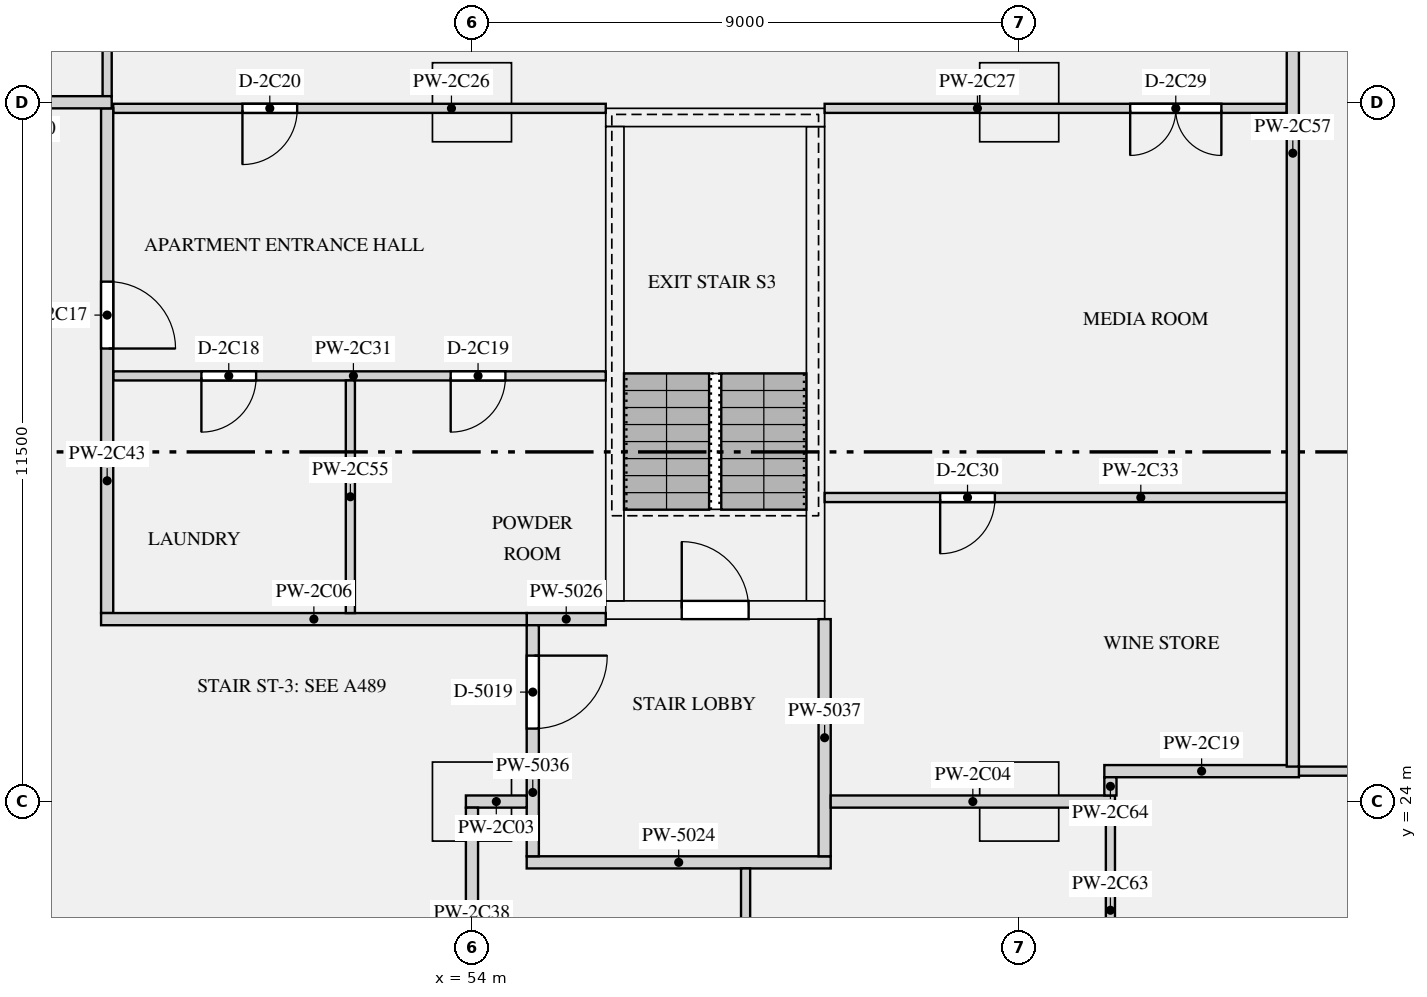
"""IFC4 building model, lengths in metres.
Left out: names, types, materials, properties, quantities, classifications, styles, units other than length and angle.
Written with IfcOpenShell. Run it as: python <this file> out.ifc"""

import sys

from ifc_helpers import new_model, si_unit, direction, frame, frame_2d, origin, origin_2d, place, context, subcontext, project, spatial, rectangle, extrude, element, fill, save


model = new_model("IFC4")
c1 = context("Model", 3, precision=1e-05, world=origin(), true_north=direction((0.0, 1.0)))
c2 = subcontext(c1, "Body", "Model", "MODEL_VIEW")
j1 = project(units=[si_unit("LENGTHUNIT", "METRE"), si_unit("PLANEANGLEUNIT", "RADIAN")], contexts=[c1])
p1 = place(None, origin())
s1 = spatial("IfcSite", under=j1, at=p1, CompositionType="ELEMENT")
p2 = place(p1, origin())
s2 = spatial("IfcBuilding", under=s1, at=p2, CompositionType="ELEMENT")
p3 = place(p2, frame((0.0, 0.0, 102.45)))
s3 = spatial("IfcBuildingStorey", under=s2, at=p3, CompositionType="ELEMENT", Elevation=102.45)
for number, where, z_axis, x_axis in (
    (1, (54.0, 24.0, 0.0), (0.0, 0.0, 1.0), (1.0, 0.0, 0.0)),
    (2, (63.0, 24.0, 0.0), (0.0, 0.0, 1.0), (1.0, 0.0, 0.0)),
    (3, (54.0, 35.5, 0.0), (0.0, 0.0, 1.0), (1.0, 0.0, 0.0)),
    (4, (63.0, 35.5, 0.0), (0.0, 0.0, 1.0), (1.0, 0.0, 0.0)),
):
    element("IfcColumn", number, at=place(p3, frame(where, z_axis=z_axis, x_axis=x_axis)), inside=s3, PredefinedType="COLUMN", context=c2, shape_type="SweptSolid", body=[
        extrude(rectangle(XDim=1.3, YDim=1.3, at=origin_2d()), origin(), (0.0, 0.0, 1.0), 3.15),
    ])
p4 = place(p3, frame((56.2, 27.15, 0.0), z_axis=(0.0, 0.0, 1.0), x_axis=(1.0, 0.0, 0.0)))
e5 = element("IfcWall", 5, at=p4, inside=s3, PredefinedType="SHEAR", context=c2, shape_type="SweptSolid", body=[
    extrude(rectangle(XDim=3.6, YDim=0.3, at=frame_2d((1.8, 0.0))), origin(), (0.0, 0.0, 1.0), 3.15),
])
p5 = place(p4, frame((1.25, 0.0, 0.0)))
e6 = element("IfcOpeningElement", 6, at=p5, cuts=e5, PredefinedType="OPENING", context=c2, shape_type="SweptSolid", body=[
    extrude(rectangle(XDim=1.1, YDim=2.1, at=frame_2d((0.55, 1.05))), frame((0.0, 0.16, 0.0), z_axis=(0.0, -1.0, 0.0), x_axis=(1.0, 0.0, 0.0)), (0.0, 0.0, 1.0), 0.32),
])
p6 = place(p3, frame((56.2, 35.25, 0.0), z_axis=(0.0, 0.0, 1.0), x_axis=(1.0, 0.0, 0.0)))
e7 = element("IfcWall", 7, at=p6, inside=s3, PredefinedType="SHEAR", context=c2, shape_type="SweptSolid", body=[
    extrude(rectangle(XDim=3.6, YDim=0.3, at=frame_2d((1.8, 0.0))), origin(), (0.0, 0.0, 1.0), 3.15),
])
for number, where, z_axis, x_axis in (
    (8, (56.35, 27.3, 0.0), (0.0, 0.0, 1.0), (0.0, 1.0, 0.0)),
    (9, (59.65, 27.3, 0.0), (0.0, 0.0, 1.0), (0.0, 1.0, 0.0)),
):
    element("IfcWall", number, at=place(p3, frame(where, z_axis=z_axis, x_axis=x_axis)), inside=s3, PredefinedType="SHEAR", context=c2, shape_type="SweptSolid", body=[
        extrude(rectangle(XDim=7.8, YDim=0.3, at=frame_2d((3.9, 0.0))), origin(), (0.0, 0.0, 1.0), 3.15),
    ])
p7 = place(p3, frame((54.9, 23.0, 0.0), z_axis=(0.0, 0.0, 1.0), x_axis=(1.0, 0.0, 0.0)))
e10 = element("IfcWall", 10, at=p7, inside=s3, PredefinedType="PARTITIONING", context=c2, shape_type="SweptSolid", body=[
    extrude(rectangle(XDim=5.0, YDim=0.2, at=frame_2d((2.5, 0.0))), origin(), (0.0, 0.0, 1.0), 2.83),
])
p8 = place(p3, frame((54.9, 27.0, 0.0), z_axis=(0.0, 0.0, 1.0), x_axis=(1.0, 0.0, 0.0)))
e11 = element("IfcWall", 11, at=p8, inside=s3, PredefinedType="PARTITIONING", context=c2, shape_type="SweptSolid", body=[
    extrude(rectangle(XDim=1.3, YDim=0.2, at=frame_2d((0.65, 0.0))), origin(), (0.0, 0.0, 1.0), 2.83),
])
p9 = place(p3, frame((55.0, 23.1, 0.0), z_axis=(0.0, 0.0, 1.0), x_axis=(0.0, 1.0, 0.0)))
e12 = element("IfcWall", 12, at=p9, inside=s3, PredefinedType="PARTITIONING", context=c2, shape_type="SweptSolid", body=[
    extrude(rectangle(XDim=3.8, YDim=0.2, at=frame_2d((1.9, 0.0))), origin(), (0.0, 0.0, 1.0), 2.83),
])
p10 = place(p9, frame((2.1, 0.0, 0.0)))
e13 = element("IfcOpeningElement", 13, at=p10, cuts=e12, PredefinedType="OPENING", context=c2, shape_type="SweptSolid", body=[
    extrude(rectangle(XDim=1.2, YDim=2.1, at=frame_2d((0.6, 1.05))), frame((0.0, 0.11, 0.0), z_axis=(0.0, -1.0, 0.0), x_axis=(1.0, 0.0, 0.0)), (0.0, 0.0, 1.0), 0.22),
])
p11 = place(p3, frame((59.8, 23.1, 0.0), z_axis=(0.0, 0.0, 1.0), x_axis=(0.0, 1.0, 0.0)))
e14 = element("IfcWall", 14, at=p11, inside=s3, PredefinedType="PARTITIONING", context=c2, shape_type="SweptSolid", body=[
    extrude(rectangle(XDim=3.9, YDim=0.2, at=frame_2d((1.95, 0.0))), origin(), (0.0, 0.0, 1.0), 2.83),
])
p12 = place(p3, frame((53.9, 24.0, 0.0), z_axis=(0.0, 0.0, 1.0), x_axis=(1.0, 0.0, 0.0)))
e15 = element("IfcWall", 15, at=p12, inside=s3, PredefinedType="PARTITIONING", context=c2, shape_type="SweptSolid", body=[
    extrude(rectangle(XDim=1.0, YDim=0.2, at=frame_2d((0.5, 0.0))), origin(), (0.0, 0.0, 1.0), 2.83),
])
p13 = place(p3, frame((59.9, 24.0, 0.0), z_axis=(0.0, 0.0, 1.0), x_axis=(1.0, 0.0, 0.0)))
e16 = element("IfcWall", 16, at=p13, inside=s3, PredefinedType="PARTITIONING", context=c2, shape_type="SweptSolid", body=[
    extrude(rectangle(XDim=4.675, YDim=0.2, at=frame_2d((2.337, 0.0))), origin(), (0.0, 0.0, 1.0), 2.83),
])
p14 = place(p3, frame((47.9, 27.0, 0.0), z_axis=(0.0, 0.0, 1.0), x_axis=(1.0, 0.0, 0.0)))
e17 = element("IfcWall", 17, at=p14, inside=s3, PredefinedType="PARTITIONING", context=c2, shape_type="SweptSolid", body=[
    extrude(rectangle(XDim=7.0, YDim=0.2, at=frame_2d((3.5, 0.0))), origin(), (0.0, 0.0, 1.0), 2.83),
])
p15 = place(p3, frame((45.0, 35.5, 0.0), z_axis=(0.0, 0.0, 1.0), x_axis=(1.0, 0.0, 0.0)))
e18 = element("IfcWall", 18, at=p15, inside=s3, PredefinedType="PARTITIONING", context=c2, shape_type="SweptSolid", body=[
    extrude(rectangle(XDim=3.075, YDim=0.2, at=frame_2d((1.538, 0.0))), origin(), (0.0, 0.0, 1.0), 2.83),
])
p16 = place(p3, frame((67.4, 24.5, 0.0), z_axis=(0.0, 0.0, 1.0), x_axis=(1.0, 0.0, 0.0)))
e19 = element("IfcWall", 19, at=p16, inside=s3, PredefinedType="PARTITIONING", context=c2, shape_type="SweptSolid", body=[
    extrude(rectangle(XDim=4.675, YDim=0.15, at=frame_2d((2.337, 0.0))), origin(), (0.0, 0.0, 1.0), 2.83),
])
p17 = place(p16, frame((1.275, 0.0, 0.0)))
e20 = element("IfcOpeningElement", 20, at=p17, cuts=e19, PredefinedType="OPENING", context=c2, shape_type="SweptSolid", body=[
    extrude(rectangle(XDim=1.5, YDim=2.1, at=frame_2d((0.75, 1.05))), frame((0.0, 0.085, 0.0), z_axis=(0.0, -1.0, 0.0), x_axis=(1.0, 0.0, 0.0)), (0.0, 0.0, 1.0), 0.17),
])
p18 = place(p3, frame((64.4, 24.5, 0.0), z_axis=(0.0, 0.0, 1.0), x_axis=(1.0, 0.0, 0.0)))
e21 = element("IfcWall", 21, at=p18, inside=s3, PredefinedType="PARTITIONING", context=c2, shape_type="SweptSolid", body=[
    extrude(rectangle(XDim=3.2, YDim=0.2, at=frame_2d((1.6, 0.0))), origin(), (0.0, 0.0, 1.0), 2.83),
])
p19 = place(p3, frame((48.1, 35.4, 0.0), z_axis=(0.0, 0.0, 1.0), x_axis=(1.0, 0.0, 0.0)))
e22 = element("IfcWall", 22, at=p19, inside=s3, PredefinedType="PARTITIONING", context=c2, shape_type="SweptSolid", body=[
    extrude(rectangle(XDim=8.1, YDim=0.15, at=frame_2d((4.05, 0.0))), origin(), (0.0, 0.0, 1.0), 2.83),
])
p20 = place(p19, frame((2.125, 0.0, 0.0)))
e23 = element("IfcOpeningElement", 23, at=p20, cuts=e22, PredefinedType="OPENING", context=c2, shape_type="SweptSolid", body=[
    extrude(rectangle(XDim=0.9, YDim=2.1, at=frame_2d((0.45, 1.05))), frame((0.0, 0.085, 0.0), z_axis=(0.0, -1.0, 0.0), x_axis=(1.0, 0.0, 0.0)), (0.0, 0.0, 1.0), 0.17),
])
p21 = place(p3, frame((59.8, 35.4, 0.0), z_axis=(0.0, 0.0, 1.0), x_axis=(1.0, 0.0, 0.0)))
e24 = element("IfcWall", 24, at=p21, inside=s3, PredefinedType="PARTITIONING", context=c2, shape_type="SweptSolid", body=[
    extrude(rectangle(XDim=7.6, YDim=0.15, at=frame_2d((3.8, 0.0))), origin(), (0.0, 0.0, 1.0), 2.83),
])
p22 = place(p21, frame((5.025, 0.0, 0.0)))
e25 = element("IfcOpeningElement", 25, at=p22, cuts=e24, PredefinedType="OPENING", context=c2, shape_type="SweptSolid", body=[
    extrude(rectangle(XDim=1.5, YDim=2.1, at=frame_2d((0.75, 1.05))), frame((0.0, 0.085, 0.0), z_axis=(0.0, -1.0, 0.0), x_axis=(1.0, 0.0, 0.0)), (0.0, 0.0, 1.0), 0.17),
])
p23 = place(p3, frame((48.1, 31.0, 0.0), z_axis=(0.0, 0.0, 1.0), x_axis=(1.0, 0.0, 0.0)))
e26 = element("IfcWall", 26, at=p23, inside=s3, PredefinedType="PARTITIONING", context=c2, shape_type="SweptSolid", body=[
    extrude(rectangle(XDim=8.1, YDim=0.15, at=frame_2d((4.05, 0.0))), origin(), (0.0, 0.0, 1.0), 2.83),
])
p24 = place(p23, frame((1.45, 0.0, 0.0)))
e27 = element("IfcOpeningElement", 27, at=p24, cuts=e26, PredefinedType="OPENING", context=c2, shape_type="SweptSolid", body=[
    extrude(rectangle(XDim=0.9, YDim=2.1, at=frame_2d((0.45, 1.05))), frame((0.0, 0.085, 0.0), z_axis=(0.0, -1.0, 0.0), x_axis=(1.0, 0.0, 0.0)), (0.0, 0.0, 1.0), 0.17),
])
p25 = place(p23, frame((5.55, 0.0, 0.0)))
e28 = element("IfcOpeningElement", 28, at=p25, cuts=e26, PredefinedType="OPENING", context=c2, shape_type="SweptSolid", body=[
    extrude(rectangle(XDim=0.9, YDim=2.1, at=frame_2d((0.45, 1.05))), frame((0.0, 0.085, 0.0), z_axis=(0.0, -1.0, 0.0), x_axis=(1.0, 0.0, 0.0)), (0.0, 0.0, 1.0), 0.17),
])
p26 = place(p3, frame((59.8, 29.0, 0.0), z_axis=(0.0, 0.0, 1.0), x_axis=(1.0, 0.0, 0.0)))
e29 = element("IfcWall", 29, at=p26, inside=s3, PredefinedType="PARTITIONING", context=c2, shape_type="SweptSolid", body=[
    extrude(rectangle(XDim=7.6, YDim=0.15, at=frame_2d((3.8, 0.0))), origin(), (0.0, 0.0, 1.0), 2.83),
])
p27 = place(p26, frame((1.9, 0.0, 0.0)))
e30 = element("IfcOpeningElement", 30, at=p27, cuts=e29, PredefinedType="OPENING", context=c2, shape_type="SweptSolid", body=[
    extrude(rectangle(XDim=0.9, YDim=2.1, at=frame_2d((0.45, 1.05))), frame((0.0, 0.085, 0.0), z_axis=(0.0, -1.0, 0.0), x_axis=(1.0, 0.0, 0.0)), (0.0, 0.0, 1.0), 0.17),
])
p28 = place(p3, frame((54.0, 16.1, 0.0), z_axis=(0.0, 0.0, 1.0), x_axis=(0.0, 1.0, 0.0)))
e31 = element("IfcWall", 31, at=p28, inside=s3, PredefinedType="PARTITIONING", context=c2, shape_type="SweptSolid", body=[
    extrude(rectangle(XDim=7.8, YDim=0.2, at=frame_2d((3.9, 0.0))), origin(), (0.0, 0.0, 1.0), 2.83),
])
p29 = place(p28, frame((2.35, 0.0, 0.0)))
e32 = element("IfcOpeningElement", 32, at=p29, cuts=e31, PredefinedType="OPENING", context=c2, shape_type="SweptSolid", body=[
    extrude(rectangle(XDim=1.1, YDim=2.1, at=frame_2d((0.55, 1.05))), frame((0.0, 0.11, 0.0), z_axis=(0.0, -1.0, 0.0), x_axis=(1.0, 0.0, 0.0)), (0.0, 0.0, 1.0), 0.22),
])
p30 = place(p3, frame((48.0, 35.6, 0.0), z_axis=(0.0, 0.0, 1.0), x_axis=(0.0, 1.0, 0.0)))
e33 = element("IfcWall", 33, at=p30, inside=s3, PredefinedType="PARTITIONING", context=c2, shape_type="SweptSolid", body=[
    extrude(rectangle(XDim=3.125, YDim=0.15, at=frame_2d((1.562, 0.0))), origin(), (0.0, 0.0, 1.0), 2.83),
])
p31 = place(p30, frame((1.1, 0.0, 0.0)))
e34 = element("IfcOpeningElement", 34, at=p31, cuts=e33, PredefinedType="OPENING", context=c2, shape_type="SweptSolid", body=[
    extrude(rectangle(XDim=0.9, YDim=2.1, at=frame_2d((0.45, 1.05))), frame((0.0, 0.085, 0.0), z_axis=(0.0, -1.0, 0.0), x_axis=(1.0, 0.0, 0.0)), (0.0, 0.0, 1.0), 0.17),
])
p32 = place(p3, frame((48.0, 27.1, 0.0), z_axis=(0.0, 0.0, 1.0), x_axis=(0.0, 1.0, 0.0)))
e35 = element("IfcWall", 35, at=p32, inside=s3, PredefinedType="PARTITIONING", context=c2, shape_type="SweptSolid", body=[
    extrude(rectangle(XDim=8.3, YDim=0.2, at=frame_2d((4.15, 0.0))), origin(), (0.0, 0.0, 1.0), 2.83),
])
p33 = place(p32, frame((4.35, 0.0, 0.0)))
e36 = element("IfcOpeningElement", 36, at=p33, cuts=e35, PredefinedType="OPENING", context=c2, shape_type="SweptSolid", body=[
    extrude(rectangle(XDim=1.1, YDim=2.1, at=frame_2d((0.55, 1.05))), frame((0.0, 0.11, 0.0), z_axis=(0.0, -1.0, 0.0), x_axis=(1.0, 0.0, 0.0)), (0.0, 0.0, 1.0), 0.22),
])
p34 = place(p3, frame((52.0, 27.1, 0.0), z_axis=(0.0, 0.0, 1.0), x_axis=(0.0, 1.0, 0.0)))
e37 = element("IfcWall", 37, at=p34, inside=s3, PredefinedType="PARTITIONING", context=c2, shape_type="SweptSolid", body=[
    extrude(rectangle(XDim=3.825, YDim=0.15, at=frame_2d((1.913, 0.0))), origin(), (0.0, 0.0, 1.0), 2.83),
])
p35 = place(p3, frame((67.5, 24.575, 0.0), z_axis=(0.0, 0.0, 1.0), x_axis=(0.0, 1.0, 0.0)))
e38 = element("IfcWall", 38, at=p35, inside=s3, PredefinedType="PARTITIONING", context=c2, shape_type="SweptSolid", body=[
    extrude(rectangle(XDim=20.175, YDim=0.2, at=frame_2d((10.087, 0.0))), origin(), (0.0, 0.0, 1.0), 2.83),
])
p36 = place(p3, frame((58.5, 16.575, 0.0), z_axis=(0.0, 0.0, 1.0), x_axis=(0.0, 1.0, 0.0)))
e39 = element("IfcWall", 39, at=p36, inside=s3, PredefinedType="PARTITIONING", context=c2, shape_type="SweptSolid", body=[
    extrude(rectangle(XDim=6.325, YDim=0.15, at=frame_2d((3.163, 0.0))), origin(), (0.0, 0.0, 1.0), 2.83),
])
p37 = place(p36, frame((2.75, 0.0, 0.0)))
e40 = element("IfcOpeningElement", 40, at=p37, cuts=e39, PredefinedType="OPENING", context=c2, shape_type="SweptSolid", body=[
    extrude(rectangle(XDim=0.9, YDim=2.1, at=frame_2d((0.45, 1.05))), frame((0.0, 0.085, 0.0), z_axis=(0.0, -1.0, 0.0), x_axis=(1.0, 0.0, 0.0)), (0.0, 0.0, 1.0), 0.17),
])
p38 = place(p3, frame((64.5, 16.575, 0.0), z_axis=(0.0, 0.0, 1.0), x_axis=(0.0, 1.0, 0.0)))
e41 = element("IfcWall", 41, at=p38, inside=s3, PredefinedType="PARTITIONING", context=c2, shape_type="SweptSolid", body=[
    extrude(rectangle(XDim=7.325, YDim=0.15, at=frame_2d((3.663, 0.0))), origin(), (0.0, 0.0, 1.0), 2.83),
])
p39 = place(p38, frame((3.05, 0.0, 0.0)))
e42 = element("IfcOpeningElement", 42, at=p39, cuts=e41, PredefinedType="OPENING", context=c2, shape_type="SweptSolid", body=[
    extrude(rectangle(XDim=0.9, YDim=2.1, at=frame_2d((0.45, 1.05))), frame((0.0, 0.085, 0.0), z_axis=(0.0, -1.0, 0.0), x_axis=(1.0, 0.0, 0.0)), (0.0, 0.0, 1.0), 0.17),
])
p40 = place(p3, frame((64.5, 24.1, 0.0), z_axis=(0.0, 0.0, 1.0), x_axis=(0.0, 1.0, 0.0)))
e43 = element("IfcWall", 43, at=p40, inside=s3, PredefinedType="PARTITIONING", context=c2, shape_type="SweptSolid", body=[
    extrude(rectangle(XDim=0.3, YDim=0.2, at=frame_2d((0.15, 0.0))), origin(), (0.0, 0.0, 1.0), 2.83),
])
p41 = place(p5, origin())
e44 = element("IfcDoor", 44, at=p41, inside=s3, OperationType="SINGLE_SWING_LEFT", PredefinedType="DOOR", context=c2, shape_type="SweptSolid", body=[
    extrude(rectangle(XDim=1.1, YDim=2.1, at=frame_2d((0.55, 1.05))), frame((0.0, 0.025, 0.0), z_axis=(0.0, -1.0, 0.0), x_axis=(1.0, 0.0, 0.0)), (0.0, 0.0, 1.0), 0.05),
])
fill(e6, e44)
p42 = place(p10, frame((1.2, 0.0, 0.0), z_axis=(0.0, 0.0, 1.0), x_axis=(-1.0, 0.0, 0.0)))
e45 = element("IfcDoor", 45, at=p42, inside=s3, OperationType="SINGLE_SWING_LEFT", PredefinedType="DOOR", context=c2, shape_type="SweptSolid", body=[
    extrude(rectangle(XDim=1.2, YDim=2.1, at=frame_2d((0.6, 1.05))), frame((0.0, 0.025, 0.0), z_axis=(0.0, -1.0, 0.0), x_axis=(1.0, 0.0, 0.0)), (0.0, 0.0, 1.0), 0.05),
])
fill(e13, e45)
p43 = place(p33, frame((1.1, 0.0, 0.0), z_axis=(0.0, 0.0, 1.0), x_axis=(-1.0, 0.0, 0.0)))
e46 = element("IfcDoor", 46, at=p43, inside=s3, OperationType="SINGLE_SWING_RIGHT", PredefinedType="DOOR", context=c2, shape_type="SweptSolid", body=[
    extrude(rectangle(XDim=1.1, YDim=2.1, at=frame_2d((0.55, 1.05))), frame((0.0, 0.025, 0.0), z_axis=(0.0, -1.0, 0.0), x_axis=(1.0, 0.0, 0.0)), (0.0, 0.0, 1.0), 0.05),
])
fill(e36, e46)
p44 = place(p24, frame((0.9, 0.0, 0.0), z_axis=(0.0, 0.0, 1.0), x_axis=(-1.0, 0.0, 0.0)))
e47 = element("IfcDoor", 47, at=p44, inside=s3, OperationType="SINGLE_SWING_RIGHT", PredefinedType="DOOR", context=c2, shape_type="SweptSolid", body=[
    extrude(rectangle(XDim=0.9, YDim=2.1, at=frame_2d((0.45, 1.05))), frame((0.0, 0.025, 0.0), z_axis=(0.0, -1.0, 0.0), x_axis=(1.0, 0.0, 0.0)), (0.0, 0.0, 1.0), 0.05),
])
fill(e27, e47)
p45 = place(p25, frame((0.9, 0.0, 0.0), z_axis=(0.0, 0.0, 1.0), x_axis=(-1.0, 0.0, 0.0)))
e48 = element("IfcDoor", 48, at=p45, inside=s3, OperationType="SINGLE_SWING_RIGHT", PredefinedType="DOOR", context=c2, shape_type="SweptSolid", body=[
    extrude(rectangle(XDim=0.9, YDim=2.1, at=frame_2d((0.45, 1.05))), frame((0.0, 0.025, 0.0), z_axis=(0.0, -1.0, 0.0), x_axis=(1.0, 0.0, 0.0)), (0.0, 0.0, 1.0), 0.05),
])
fill(e28, e48)
p46 = place(p20, frame((0.9, 0.0, 0.0), z_axis=(0.0, 0.0, 1.0), x_axis=(-1.0, 0.0, 0.0)))
e49 = element("IfcDoor", 49, at=p46, inside=s3, OperationType="SINGLE_SWING_RIGHT", PredefinedType="DOOR", context=c2, shape_type="SweptSolid", body=[
    extrude(rectangle(XDim=0.9, YDim=2.1, at=frame_2d((0.45, 1.05))), frame((0.0, 0.025, 0.0), z_axis=(0.0, -1.0, 0.0), x_axis=(1.0, 0.0, 0.0)), (0.0, 0.0, 1.0), 0.05),
])
fill(e23, e49)
p47 = place(p22, frame((1.5, 0.0, 0.0), z_axis=(0.0, 0.0, 1.0), x_axis=(-1.0, 0.0, 0.0)))
e50 = element("IfcDoor", 50, at=p47, inside=s3, OperationType="DOUBLE_DOOR_SINGLE_SWING", PredefinedType="DOOR", context=c2, shape_type="SweptSolid", body=[
    extrude(rectangle(XDim=1.5, YDim=2.1, at=frame_2d((0.75, 1.05))), frame((0.0, 0.025, 0.0), z_axis=(0.0, -1.0, 0.0), x_axis=(1.0, 0.0, 0.0)), (0.0, 0.0, 1.0), 0.05),
])
fill(e25, e50)
p48 = place(p27, frame((0.9, 0.0, 0.0), z_axis=(0.0, 0.0, 1.0), x_axis=(-1.0, 0.0, 0.0)))
e51 = element("IfcDoor", 51, at=p48, inside=s3, OperationType="SINGLE_SWING_RIGHT", PredefinedType="DOOR", context=c2, shape_type="SweptSolid", body=[
    extrude(rectangle(XDim=0.9, YDim=2.1, at=frame_2d((0.45, 1.05))), frame((0.0, 0.025, 0.0), z_axis=(0.0, -1.0, 0.0), x_axis=(1.0, 0.0, 0.0)), (0.0, 0.0, 1.0), 0.05),
])
fill(e30, e51)
save(model, sys.argv[1])
